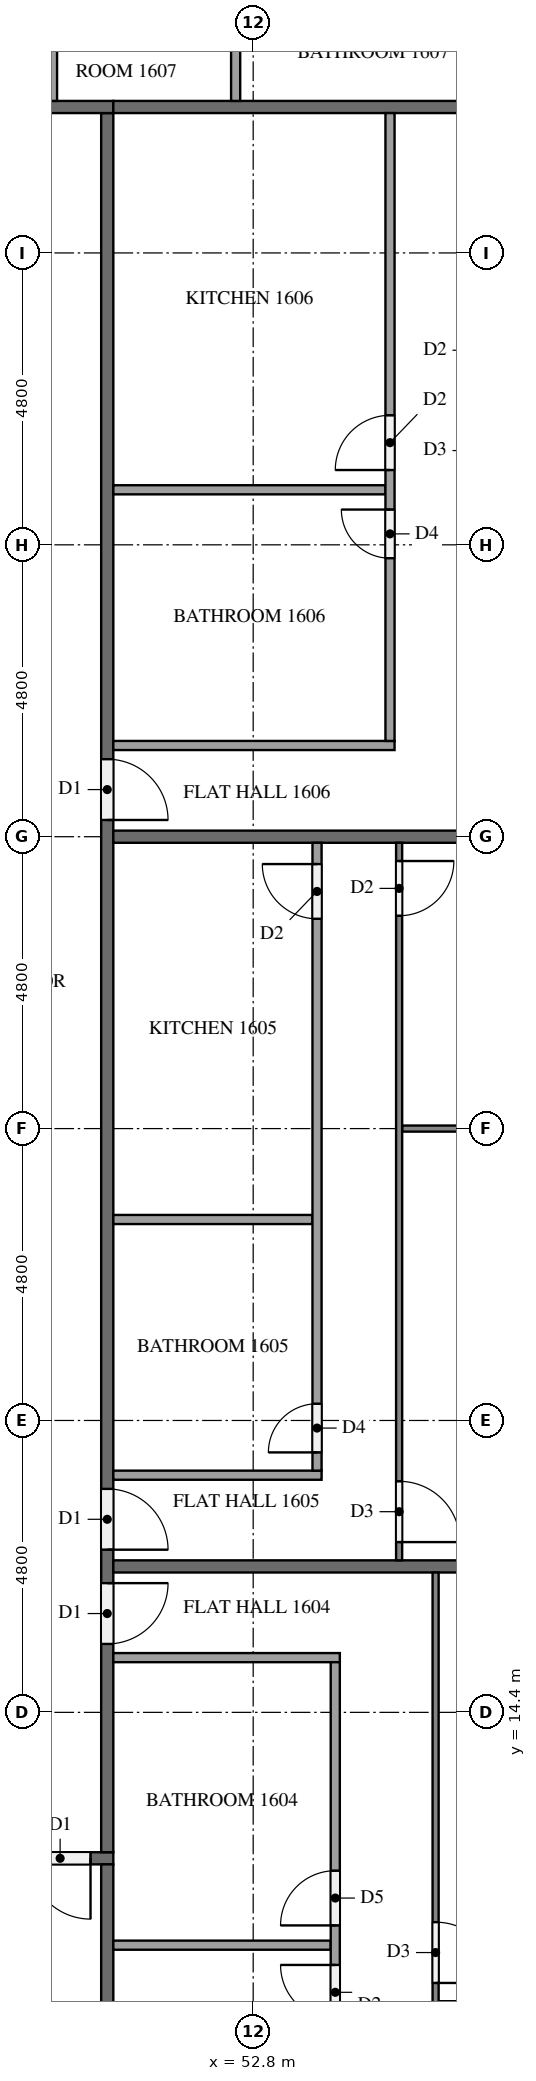
"""IFC4 building model, lengths in metres.
Left out: names, types, materials, properties, quantities, classifications, styles, units other than length and angle.
Written with IfcOpenShell. Run it as: python <this file> out.ifc"""

import sys

from ifc_helpers import new_model, si_unit, direction, frame, frame_2d, origin, place, context, subcontext, project, spatial, rectangle, extrude, element, fill, save


model = new_model("IFC4")
c1 = context("Model", 3, precision=1e-05, world=origin(), true_north=direction((0.0, 1.0)))
c2 = subcontext(c1, "Body", "Model", "MODEL_VIEW")
j1 = project(units=[si_unit("LENGTHUNIT", "METRE"), si_unit("PLANEANGLEUNIT", "RADIAN")], contexts=[c1])
p1 = place(None, origin())
s1 = spatial("IfcSite", under=j1, at=p1, CompositionType="ELEMENT")
p2 = place(p1, origin())
s2 = spatial("IfcBuilding", under=s1, at=p2, CompositionType="ELEMENT")
p3 = place(p2, frame((0.0, 0.0, 66.3)))
s3 = spatial("IfcBuildingStorey", under=s2, at=p3, CompositionType="ELEMENT", Elevation=66.3)
p4 = place(p3, frame((50.5, 12.0, 0.0), z_axis=(0.0, 0.0, 1.0), x_axis=(-1.0, 0.0, 0.0)))
e1 = element("IfcWall", 1, at=p4, inside=s3, PredefinedType="PARTITIONING", context=c2, shape_type="SweptSolid", body=[
    extrude(rectangle(XDim=38.6, YDim=0.2, at=frame_2d((19.3, 0.0))), origin(), (0.0, 0.0, 1.0), 3.2),
])
p5 = place(p4, frame((37.225, 0.0, 0.0)))
e2 = element("IfcOpeningElement", 2, at=p5, cuts=e1, PredefinedType="OPENING", context=c2, shape_type="SweptSolid", body=[
    extrude(rectangle(XDim=1.0, YDim=2.1, at=frame_2d((0.5, 1.05))), frame((0.0, 0.11, 0.0), z_axis=(0.0, -1.0, 0.0), x_axis=(1.0, 0.0, 0.0)), (0.0, 0.0, 1.0), 0.22),
])
p6 = place(p4, frame((22.825, 0.0, 0.0)))
e3 = element("IfcOpeningElement", 3, at=p6, cuts=e1, PredefinedType="OPENING", context=c2, shape_type="SweptSolid", body=[
    extrude(rectangle(XDim=1.0, YDim=2.1, at=frame_2d((0.5, 1.05))), frame((0.0, 0.11, 0.0), z_axis=(0.0, -1.0, 0.0), x_axis=(1.0, 0.0, 0.0)), (0.0, 0.0, 1.0), 0.22),
])
p7 = place(p4, frame((0.375, 0.0, 0.0)))
e4 = element("IfcOpeningElement", 4, at=p7, cuts=e1, PredefinedType="OPENING", context=c2, shape_type="SweptSolid", body=[
    extrude(rectangle(XDim=1.0, YDim=2.1, at=frame_2d((0.5, 1.05))), frame((0.0, 0.11, 0.0), z_axis=(0.0, -1.0, 0.0), x_axis=(1.0, 0.0, 0.0)), (0.0, 0.0, 1.0), 0.22),
])
p8 = place(p3, frame((50.4, 40.7, 0.0), z_axis=(0.0, 0.0, 1.0), x_axis=(0.0, -1.0, 0.0)))
e5 = element("IfcWall", 5, at=p8, inside=s3, PredefinedType="PARTITIONING", context=c2, shape_type="SweptSolid", body=[
    extrude(rectangle(XDim=28.6, YDim=0.2, at=frame_2d((14.3, 0.0))), origin(), (0.0, 0.0, 1.0), 3.2),
])
p9 = place(p8, frame((24.175, 0.0, 0.0)))
e6 = element("IfcOpeningElement", 6, at=p9, cuts=e5, PredefinedType="OPENING", context=c2, shape_type="SweptSolid", body=[
    extrude(rectangle(XDim=1.0, YDim=2.1, at=frame_2d((0.5, 1.05))), frame((0.0, 0.11, 0.0), z_axis=(0.0, -1.0, 0.0), x_axis=(1.0, 0.0, 0.0)), (0.0, 0.0, 1.0), 0.22),
])
p10 = place(p8, frame((22.625, 0.0, 0.0)))
e7 = element("IfcOpeningElement", 7, at=p10, cuts=e5, PredefinedType="OPENING", context=c2, shape_type="SweptSolid", body=[
    extrude(rectangle(XDim=1.0, YDim=2.1, at=frame_2d((0.5, 1.05))), frame((0.0, 0.11, 0.0), z_axis=(0.0, -1.0, 0.0), x_axis=(1.0, 0.0, 0.0)), (0.0, 0.0, 1.0), 0.22),
])
p11 = place(p8, frame((10.625, 0.0, 0.0)))
e8 = element("IfcOpeningElement", 8, at=p11, cuts=e5, PredefinedType="OPENING", context=c2, shape_type="SweptSolid", body=[
    extrude(rectangle(XDim=1.0, YDim=2.1, at=frame_2d((0.5, 1.05))), frame((0.0, 0.11, 0.0), z_axis=(0.0, -1.0, 0.0), x_axis=(1.0, 0.0, 0.0)), (0.0, 0.0, 1.0), 0.22),
])
p12 = place(p3, frame((11.9, 40.8, 0.0), z_axis=(0.0, 0.0, 1.0), x_axis=(1.0, 0.0, 0.0)))
e9 = element("IfcWall", 9, at=p12, inside=s3, PredefinedType="PARTITIONING", context=c2, shape_type="SweptSolid", body=[
    extrude(rectangle(XDim=38.6, YDim=0.2, at=frame_2d((19.3, 0.0))), origin(), (0.0, 0.0, 1.0), 3.2),
])
p13 = place(p12, frame((36.375, 0.0, 0.0)))
e10 = element("IfcOpeningElement", 10, at=p13, cuts=e9, PredefinedType="OPENING", context=c2, shape_type="SweptSolid", body=[
    extrude(rectangle(XDim=1.0, YDim=2.1, at=frame_2d((0.5, 1.05))), frame((0.0, 0.11, 0.0), z_axis=(0.0, -1.0, 0.0), x_axis=(1.0, 0.0, 0.0)), (0.0, 0.0, 1.0), 0.22),
])
p14 = place(p12, frame((17.125, 0.0, 0.0)))
e11 = element("IfcOpeningElement", 11, at=p14, cuts=e9, PredefinedType="OPENING", context=c2, shape_type="SweptSolid", body=[
    extrude(rectangle(XDim=1.1, YDim=2.1, at=frame_2d((0.55, 1.05))), frame((0.0, 0.11, 0.0), z_axis=(0.0, -1.0, 0.0), x_axis=(1.0, 0.0, 0.0)), (0.0, 0.0, 1.0), 0.22),
])
p15 = place(p12, frame((15.625, 0.0, 0.0)))
e12 = element("IfcOpeningElement", 12, at=p15, cuts=e9, PredefinedType="OPENING", context=c2, shape_type="SweptSolid", body=[
    extrude(rectangle(XDim=1.0, YDim=2.1, at=frame_2d((0.5, 1.05))), frame((0.0, 0.11, 0.0), z_axis=(0.0, -1.0, 0.0), x_axis=(1.0, 0.0, 0.0)), (0.0, 0.0, 1.0), 0.22),
])
p16 = place(p12, frame((1.225, 0.0, 0.0)))
e13 = element("IfcOpeningElement", 13, at=p16, cuts=e9, PredefinedType="OPENING", context=c2, shape_type="SweptSolid", body=[
    extrude(rectangle(XDim=1.0, YDim=2.1, at=frame_2d((0.5, 1.05))), frame((0.0, 0.11, 0.0), z_axis=(0.0, -1.0, 0.0), x_axis=(1.0, 0.0, 0.0)), (0.0, 0.0, 1.0), 0.22),
])
p17 = place(p3, frame((50.4, 11.9, 0.0), z_axis=(0.0, 0.0, 1.0), x_axis=(0.0, -1.0, 0.0)))
e14 = element("IfcWall", 14, at=p17, inside=s3, PredefinedType="PARTITIONING", context=c2, shape_type="SweptSolid", body=[
    extrude(rectangle(XDim=11.8, YDim=0.2, at=frame_2d((5.9, 0.0))), origin(), (0.0, 0.0, 1.0), 3.2),
])
for number, where, z_axis, x_axis in (
    (15, (50.5, 16.8, 0.0), (0.0, 0.0, 1.0), (1.0, 0.0, 0.0)),
    (16, (50.5, 28.8, 0.0), (0.0, 0.0, 1.0), (1.0, 0.0, 0.0)),
    (17, (50.5, 40.8, 0.0), (0.0, 0.0, 1.0), (1.0, 0.0, 0.0)),
):
    element("IfcWall", number, at=place(p3, frame(where, z_axis=z_axis, x_axis=x_axis)), inside=s3, PredefinedType="PARTITIONING", context=c2, shape_type="SweptSolid", body=[
        extrude(rectangle(XDim=11.8, YDim=0.2, at=frame_2d((5.9, 0.0))), origin(), (0.0, 0.0, 1.0), 3.2),
    ])
p18 = place(p3, frame((55.85, 9.6, 0.0), z_axis=(0.0, 0.0, 1.0), x_axis=(1.0, 0.0, 0.0)))
e18 = element("IfcWall", 18, at=p18, inside=s3, PredefinedType="PARTITIONING", context=c2, shape_type="SweptSolid", body=[
    extrude(rectangle(XDim=6.45, YDim=0.1, at=frame_2d((3.225, 0.0))), origin(), (0.0, 0.0, 1.0), 3.2),
])
p19 = place(p3, frame((55.8, 16.7, 0.0), z_axis=(0.0, 0.0, 1.0), x_axis=(0.0, -1.0, 0.0)))
e19 = element("IfcWall", 19, at=p19, inside=s3, PredefinedType="PARTITIONING", context=c2, shape_type="SweptSolid", body=[
    extrude(rectangle(XDim=16.6, YDim=0.1, at=frame_2d((8.3, 0.0))), origin(), (0.0, 0.0, 1.0), 3.2),
])
p20 = place(p19, frame((5.75, 0.0, 0.0)))
e20 = element("IfcOpeningElement", 20, at=p20, cuts=e19, PredefinedType="OPENING", context=c2, shape_type="SweptSolid", body=[
    extrude(rectangle(XDim=1.0, YDim=2.1, at=frame_2d((0.5, 1.05))), frame((0.0, 0.06, 0.0), z_axis=(0.0, -1.0, 0.0), x_axis=(1.0, 0.0, 0.0)), (0.0, 0.0, 1.0), 0.12),
])
p21 = place(p19, frame((7.45, 0.0, 0.0)))
e21 = element("IfcOpeningElement", 21, at=p21, cuts=e19, PredefinedType="OPENING", context=c2, shape_type="SweptSolid", body=[
    extrude(rectangle(XDim=0.9, YDim=2.1, at=frame_2d((0.45, 1.05))), frame((0.0, 0.06, 0.0), z_axis=(0.0, -1.0, 0.0), x_axis=(1.0, 0.0, 0.0)), (0.0, 0.0, 1.0), 0.12),
])
p22 = place(p19, frame((15.2, 0.0, 0.0)))
e22 = element("IfcOpeningElement", 22, at=p22, cuts=e19, PredefinedType="OPENING", context=c2, shape_type="SweptSolid", body=[
    extrude(rectangle(XDim=0.9, YDim=2.1, at=frame_2d((0.45, 1.05))), frame((0.0, 0.06, 0.0), z_axis=(0.0, -1.0, 0.0), x_axis=(1.0, 0.0, 0.0)), (0.0, 0.0, 1.0), 0.12),
])
p23 = place(p3, frame((50.5, 10.571, 0.0), z_axis=(0.0, 0.0, 1.0), x_axis=(1.0, 0.0, 0.0)))
e23 = element("IfcWall", 23, at=p23, inside=s3, PredefinedType="PARTITIONING", context=c2, shape_type="SweptSolid", body=[
    extrude(rectangle(XDim=3.575, YDim=0.15, at=frame_2d((1.788, 0.0))), origin(), (0.0, 0.0, 1.0), 3.2),
])
p24 = place(p3, frame((50.5, 15.3, 0.0), z_axis=(0.0, 0.0, 1.0), x_axis=(1.0, 0.0, 0.0)))
e24 = element("IfcWall", 24, at=p24, inside=s3, PredefinedType="PARTITIONING", context=c2, shape_type="SweptSolid", body=[
    extrude(rectangle(XDim=3.725, YDim=0.15, at=frame_2d((1.863, 0.0))), origin(), (0.0, 0.0, 1.0), 3.2),
])
p25 = place(p3, frame((54.15, 0.1, 0.0), z_axis=(0.0, 0.0, 1.0), x_axis=(0.0, 1.0, 0.0)))
e25 = element("IfcWall", 25, at=p25, inside=s3, PredefinedType="PARTITIONING", context=c2, shape_type="SweptSolid", body=[
    extrude(rectangle(XDim=15.125, YDim=0.15, at=frame_2d((7.562, 0.0))), origin(), (0.0, 0.0, 1.0), 3.2),
])
p26 = place(p25, frame((10.796, 0.0, 0.0)))
e26 = element("IfcOpeningElement", 26, at=p26, cuts=e25, PredefinedType="OPENING", context=c2, shape_type="SweptSolid", body=[
    extrude(rectangle(XDim=0.9, YDim=2.1, at=frame_2d((0.45, 1.05))), frame((0.0, 0.085, 0.0), z_axis=(0.0, -1.0, 0.0), x_axis=(1.0, 0.0, 0.0)), (0.0, 0.0, 1.0), 0.17),
])
p27 = place(p25, frame((9.246, 0.0, 0.0)))
e27 = element("IfcOpeningElement", 27, at=p27, cuts=e25, PredefinedType="OPENING", context=c2, shape_type="SweptSolid", body=[
    extrude(rectangle(XDim=0.9, YDim=2.1, at=frame_2d((0.45, 1.05))), frame((0.0, 0.085, 0.0), z_axis=(0.0, -1.0, 0.0), x_axis=(1.0, 0.0, 0.0)), (0.0, 0.0, 1.0), 0.17),
])
p28 = place(p25, frame((0.35, 0.0, 0.0)))
e28 = element("IfcOpeningElement", 28, at=p28, cuts=e25, PredefinedType="OPENING", context=c2, shape_type="SweptSolid", body=[
    extrude(rectangle(XDim=0.8, YDim=2.1, at=frame_2d((0.4, 1.05))), frame((0.0, 0.085, 0.0), z_axis=(0.0, -1.0, 0.0), x_axis=(1.0, 0.0, 0.0)), (0.0, 0.0, 1.0), 0.17),
])
p29 = place(p3, frame((55.25, 24.0, 0.0), z_axis=(0.0, 0.0, 1.0), x_axis=(1.0, 0.0, 0.0)))
e29 = element("IfcWall", 29, at=p29, inside=s3, PredefinedType="PARTITIONING", context=c2, shape_type="SweptSolid", body=[
    extrude(rectangle(XDim=6.725, YDim=0.1, at=frame_2d((3.363, 0.0))), origin(), (0.0, 0.0, 1.0), 3.2),
])
p30 = place(p3, frame((55.2, 28.7, 0.0), z_axis=(0.0, 0.0, 1.0), x_axis=(0.0, -1.0, 0.0)))
e30 = element("IfcWall", 30, at=p30, inside=s3, PredefinedType="PARTITIONING", context=c2, shape_type="SweptSolid", body=[
    extrude(rectangle(XDim=11.8, YDim=0.1, at=frame_2d((5.9, 0.0))), origin(), (0.0, 0.0, 1.0), 3.2),
])
p31 = place(p30, frame((10.5, 0.0, 0.0)))
e31 = element("IfcOpeningElement", 31, at=p31, cuts=e30, PredefinedType="OPENING", context=c2, shape_type="SweptSolid", body=[
    extrude(rectangle(XDim=1.0, YDim=2.1, at=frame_2d((0.5, 1.05))), frame((0.0, 0.06, 0.0), z_axis=(0.0, -1.0, 0.0), x_axis=(1.0, 0.0, 0.0)), (0.0, 0.0, 1.0), 0.12),
])
p32 = place(p30, frame((0.3, 0.0, 0.0)))
e32 = element("IfcOpeningElement", 32, at=p32, cuts=e30, PredefinedType="OPENING", context=c2, shape_type="SweptSolid", body=[
    extrude(rectangle(XDim=0.9, YDim=2.1, at=frame_2d((0.45, 1.05))), frame((0.0, 0.06, 0.0), z_axis=(0.0, -1.0, 0.0), x_axis=(1.0, 0.0, 0.0)), (0.0, 0.0, 1.0), 0.12),
])
p33 = place(p3, frame((50.5, 22.505, 0.0), z_axis=(0.0, 0.0, 1.0), x_axis=(1.0, 0.0, 0.0)))
e33 = element("IfcWall", 33, at=p33, inside=s3, PredefinedType="PARTITIONING", context=c2, shape_type="SweptSolid", body=[
    extrude(rectangle(XDim=3.275, YDim=0.15, at=frame_2d((1.637, 0.0))), origin(), (0.0, 0.0, 1.0), 3.2),
])
p34 = place(p3, frame((50.5, 18.3, 0.0), z_axis=(0.0, 0.0, 1.0), x_axis=(1.0, 0.0, 0.0)))
e34 = element("IfcWall", 34, at=p34, inside=s3, PredefinedType="PARTITIONING", context=c2, shape_type="SweptSolid", body=[
    extrude(rectangle(XDim=3.425, YDim=0.15, at=frame_2d((1.712, 0.0))), origin(), (0.0, 0.0, 1.0), 3.2),
])
p35 = place(p3, frame((53.85, 18.375, 0.0), z_axis=(0.0, 0.0, 1.0), x_axis=(0.0, 1.0, 0.0)))
e35 = element("IfcWall", 35, at=p35, inside=s3, PredefinedType="PARTITIONING", context=c2, shape_type="SweptSolid", body=[
    extrude(rectangle(XDim=10.325, YDim=0.15, at=frame_2d((5.163, 0.0))), origin(), (0.0, 0.0, 1.0), 3.2),
])
p36 = place(p35, frame((0.3, 0.0, 0.0)))
e36 = element("IfcOpeningElement", 36, at=p36, cuts=e35, PredefinedType="OPENING", context=c2, shape_type="SweptSolid", body=[
    extrude(rectangle(XDim=0.8, YDim=2.1, at=frame_2d((0.4, 1.05))), frame((0.0, 0.085, 0.0), z_axis=(0.0, -1.0, 0.0), x_axis=(1.0, 0.0, 0.0)), (0.0, 0.0, 1.0), 0.17),
])
p37 = place(p35, frame((9.075, 0.0, 0.0)))
e37 = element("IfcOpeningElement", 37, at=p37, cuts=e35, PredefinedType="OPENING", context=c2, shape_type="SweptSolid", body=[
    extrude(rectangle(XDim=0.9, YDim=2.1, at=frame_2d((0.45, 1.05))), frame((0.0, 0.085, 0.0), z_axis=(0.0, -1.0, 0.0), x_axis=(1.0, 0.0, 0.0)), (0.0, 0.0, 1.0), 0.17),
])
p38 = place(p3, frame((50.5, 34.505, 0.0), z_axis=(0.0, 0.0, 1.0), x_axis=(1.0, 0.0, 0.0)))
e38 = element("IfcWall", 38, at=p38, inside=s3, PredefinedType="PARTITIONING", context=c2, shape_type="SweptSolid", body=[
    extrude(rectangle(XDim=4.475, YDim=0.15, at=frame_2d((2.238, 0.0))), origin(), (0.0, 0.0, 1.0), 3.2),
])
p39 = place(p3, frame((50.5, 30.3, 0.0), z_axis=(0.0, 0.0, 1.0), x_axis=(1.0, 0.0, 0.0)))
e39 = element("IfcWall", 39, at=p39, inside=s3, PredefinedType="PARTITIONING", context=c2, shape_type="SweptSolid", body=[
    extrude(rectangle(XDim=4.625, YDim=0.15, at=frame_2d((2.312, 0.0))), origin(), (0.0, 0.0, 1.0), 3.2),
])
p40 = place(p3, frame((55.05, 30.375, 0.0), z_axis=(0.0, 0.0, 1.0), x_axis=(0.0, 1.0, 0.0)))
e40 = element("IfcWall", 40, at=p40, inside=s3, PredefinedType="PARTITIONING", context=c2, shape_type="SweptSolid", body=[
    extrude(rectangle(XDim=10.325, YDim=0.15, at=frame_2d((5.163, 0.0))), origin(), (0.0, 0.0, 1.0), 3.2),
])
p41 = place(p40, frame((3.005, 0.0, 0.0)))
e41 = element("IfcOpeningElement", 41, at=p41, cuts=e40, PredefinedType="OPENING", context=c2, shape_type="SweptSolid", body=[
    extrude(rectangle(XDim=0.8, YDim=2.1, at=frame_2d((0.4, 1.05))), frame((0.0, 0.085, 0.0), z_axis=(0.0, -1.0, 0.0), x_axis=(1.0, 0.0, 0.0)), (0.0, 0.0, 1.0), 0.17),
])
p42 = place(p40, frame((4.455, 0.0, 0.0)))
e42 = element("IfcOpeningElement", 42, at=p42, cuts=e40, PredefinedType="OPENING", context=c2, shape_type="SweptSolid", body=[
    extrude(rectangle(XDim=0.9, YDim=2.1, at=frame_2d((0.45, 1.05))), frame((0.0, 0.085, 0.0), z_axis=(0.0, -1.0, 0.0), x_axis=(1.0, 0.0, 0.0)), (0.0, 0.0, 1.0), 0.17),
])
p43 = place(p3, frame((52.511, 40.9, 0.0), z_axis=(0.0, 0.0, 1.0), x_axis=(0.0, 1.0, 0.0)))
e43 = element("IfcWall", 43, at=p43, inside=s3, PredefinedType="PARTITIONING", context=c2, shape_type="SweptSolid", body=[
    extrude(rectangle(XDim=1.775, YDim=0.15, at=frame_2d((0.888, 0.0))), origin(), (0.0, 0.0, 1.0), 3.2),
])
p44 = place(p3, frame((49.5, 40.9, 0.0), z_axis=(0.0, 0.0, 1.0), x_axis=(0.0, 1.0, 0.0)))
e44 = element("IfcWall", 44, at=p44, inside=s3, PredefinedType="PARTITIONING", context=c2, shape_type="SweptSolid", body=[
    extrude(rectangle(XDim=1.925, YDim=0.15, at=frame_2d((0.962, 0.0))), origin(), (0.0, 0.0, 1.0), 3.2),
])
p45 = place(p7, origin())
e45 = element("IfcDoor", 45, at=p45, inside=s3, OperationType="SINGLE_SWING_LEFT", PredefinedType="DOOR", context=c2, shape_type="SweptSolid", body=[
    extrude(rectangle(XDim=1.0, YDim=2.1, at=frame_2d((0.5, 1.05))), frame((0.0, 0.025, 0.0), z_axis=(0.0, -1.0, 0.0), x_axis=(1.0, 0.0, 0.0)), (0.0, 0.0, 1.0), 0.05),
])
fill(e4, e45)
p46 = place(p9, origin())
e46 = element("IfcDoor", 46, at=p46, inside=s3, OperationType="SINGLE_SWING_LEFT", PredefinedType="DOOR", context=c2, shape_type="SweptSolid", body=[
    extrude(rectangle(XDim=1.0, YDim=2.1, at=frame_2d((0.5, 1.05))), frame((0.0, 0.025, 0.0), z_axis=(0.0, -1.0, 0.0), x_axis=(1.0, 0.0, 0.0)), (0.0, 0.0, 1.0), 0.05),
])
fill(e6, e46)
p47 = place(p10, origin())
e47 = element("IfcDoor", 47, at=p47, inside=s3, OperationType="SINGLE_SWING_RIGHT", PredefinedType="DOOR", context=c2, shape_type="SweptSolid", body=[
    extrude(rectangle(XDim=1.0, YDim=2.1, at=frame_2d((0.5, 1.05))), frame((0.0, 0.025, 0.0), z_axis=(0.0, -1.0, 0.0), x_axis=(1.0, 0.0, 0.0)), (0.0, 0.0, 1.0), 0.05),
])
fill(e7, e47)
p48 = place(p11, origin())
e48 = element("IfcDoor", 48, at=p48, inside=s3, OperationType="SINGLE_SWING_RIGHT", PredefinedType="DOOR", context=c2, shape_type="SweptSolid", body=[
    extrude(rectangle(XDim=1.0, YDim=2.1, at=frame_2d((0.5, 1.05))), frame((0.0, 0.025, 0.0), z_axis=(0.0, -1.0, 0.0), x_axis=(1.0, 0.0, 0.0)), (0.0, 0.0, 1.0), 0.05),
])
fill(e8, e48)
p49 = place(p20, origin())
e49 = element("IfcDoor", 49, at=p49, inside=s3, OperationType="SINGLE_SWING_RIGHT", PredefinedType="DOOR", context=c2, shape_type="SweptSolid", body=[
    extrude(rectangle(XDim=1.0, YDim=2.1, at=frame_2d((0.5, 1.05))), frame((0.0, 0.025, 0.0), z_axis=(0.0, -1.0, 0.0), x_axis=(1.0, 0.0, 0.0)), (0.0, 0.0, 1.0), 0.05),
])
fill(e20, e49)
p50 = place(p26, origin())
e50 = element("IfcDoor", 50, at=p50, inside=s3, OperationType="SINGLE_SWING_LEFT", PredefinedType="DOOR", context=c2, shape_type="SweptSolid", body=[
    extrude(rectangle(XDim=0.9, YDim=2.1, at=frame_2d((0.45, 1.05))), frame((0.0, 0.025, 0.0), z_axis=(0.0, -1.0, 0.0), x_axis=(1.0, 0.0, 0.0)), (0.0, 0.0, 1.0), 0.05),
])
fill(e26, e50)
p51 = place(p27, origin())
e51 = element("IfcDoor", 51, at=p51, inside=s3, OperationType="SINGLE_SWING_RIGHT", PredefinedType="DOOR", context=c2, shape_type="SweptSolid", body=[
    extrude(rectangle(XDim=0.9, YDim=2.1, at=frame_2d((0.45, 1.05))), frame((0.0, 0.025, 0.0), z_axis=(0.0, -1.0, 0.0), x_axis=(1.0, 0.0, 0.0)), (0.0, 0.0, 1.0), 0.05),
])
fill(e27, e51)
p52 = place(p31, origin())
e52 = element("IfcDoor", 52, at=p52, inside=s3, OperationType="SINGLE_SWING_RIGHT", PredefinedType="DOOR", context=c2, shape_type="SweptSolid", body=[
    extrude(rectangle(XDim=1.0, YDim=2.1, at=frame_2d((0.5, 1.05))), frame((0.0, 0.025, 0.0), z_axis=(0.0, -1.0, 0.0), x_axis=(1.0, 0.0, 0.0)), (0.0, 0.0, 1.0), 0.05),
])
fill(e31, e52)
p53 = place(p32, origin())
e53 = element("IfcDoor", 53, at=p53, inside=s3, OperationType="SINGLE_SWING_LEFT", PredefinedType="DOOR", context=c2, shape_type="SweptSolid", body=[
    extrude(rectangle(XDim=0.9, YDim=2.1, at=frame_2d((0.45, 1.05))), frame((0.0, 0.025, 0.0), z_axis=(0.0, -1.0, 0.0), x_axis=(1.0, 0.0, 0.0)), (0.0, 0.0, 1.0), 0.05),
])
fill(e32, e53)
p54 = place(p36, origin())
e54 = element("IfcDoor", 54, at=p54, inside=s3, OperationType="SINGLE_SWING_LEFT", PredefinedType="DOOR", context=c2, shape_type="SweptSolid", body=[
    extrude(rectangle(XDim=0.8, YDim=2.1, at=frame_2d((0.4, 1.05))), frame((0.0, 0.025, 0.0), z_axis=(0.0, -1.0, 0.0), x_axis=(1.0, 0.0, 0.0)), (0.0, 0.0, 1.0), 0.05),
])
fill(e36, e54)
p55 = place(p37, origin())
e55 = element("IfcDoor", 55, at=p55, inside=s3, OperationType="SINGLE_SWING_RIGHT", PredefinedType="DOOR", context=c2, shape_type="SweptSolid", body=[
    extrude(rectangle(XDim=0.9, YDim=2.1, at=frame_2d((0.45, 1.05))), frame((0.0, 0.025, 0.0), z_axis=(0.0, -1.0, 0.0), x_axis=(1.0, 0.0, 0.0)), (0.0, 0.0, 1.0), 0.05),
])
fill(e37, e55)
p56 = place(p41, origin())
e56 = element("IfcDoor", 56, at=p56, inside=s3, OperationType="SINGLE_SWING_RIGHT", PredefinedType="DOOR", context=c2, shape_type="SweptSolid", body=[
    extrude(rectangle(XDim=0.8, YDim=2.1, at=frame_2d((0.4, 1.05))), frame((0.0, 0.025, 0.0), z_axis=(0.0, -1.0, 0.0), x_axis=(1.0, 0.0, 0.0)), (0.0, 0.0, 1.0), 0.05),
])
fill(e41, e56)
p57 = place(p42, origin())
e57 = element("IfcDoor", 57, at=p57, inside=s3, OperationType="SINGLE_SWING_LEFT", PredefinedType="DOOR", context=c2, shape_type="SweptSolid", body=[
    extrude(rectangle(XDim=0.9, YDim=2.1, at=frame_2d((0.45, 1.05))), frame((0.0, 0.025, 0.0), z_axis=(0.0, -1.0, 0.0), x_axis=(1.0, 0.0, 0.0)), (0.0, 0.0, 1.0), 0.05),
])
fill(e42, e57)
save(model, sys.argv[1])
